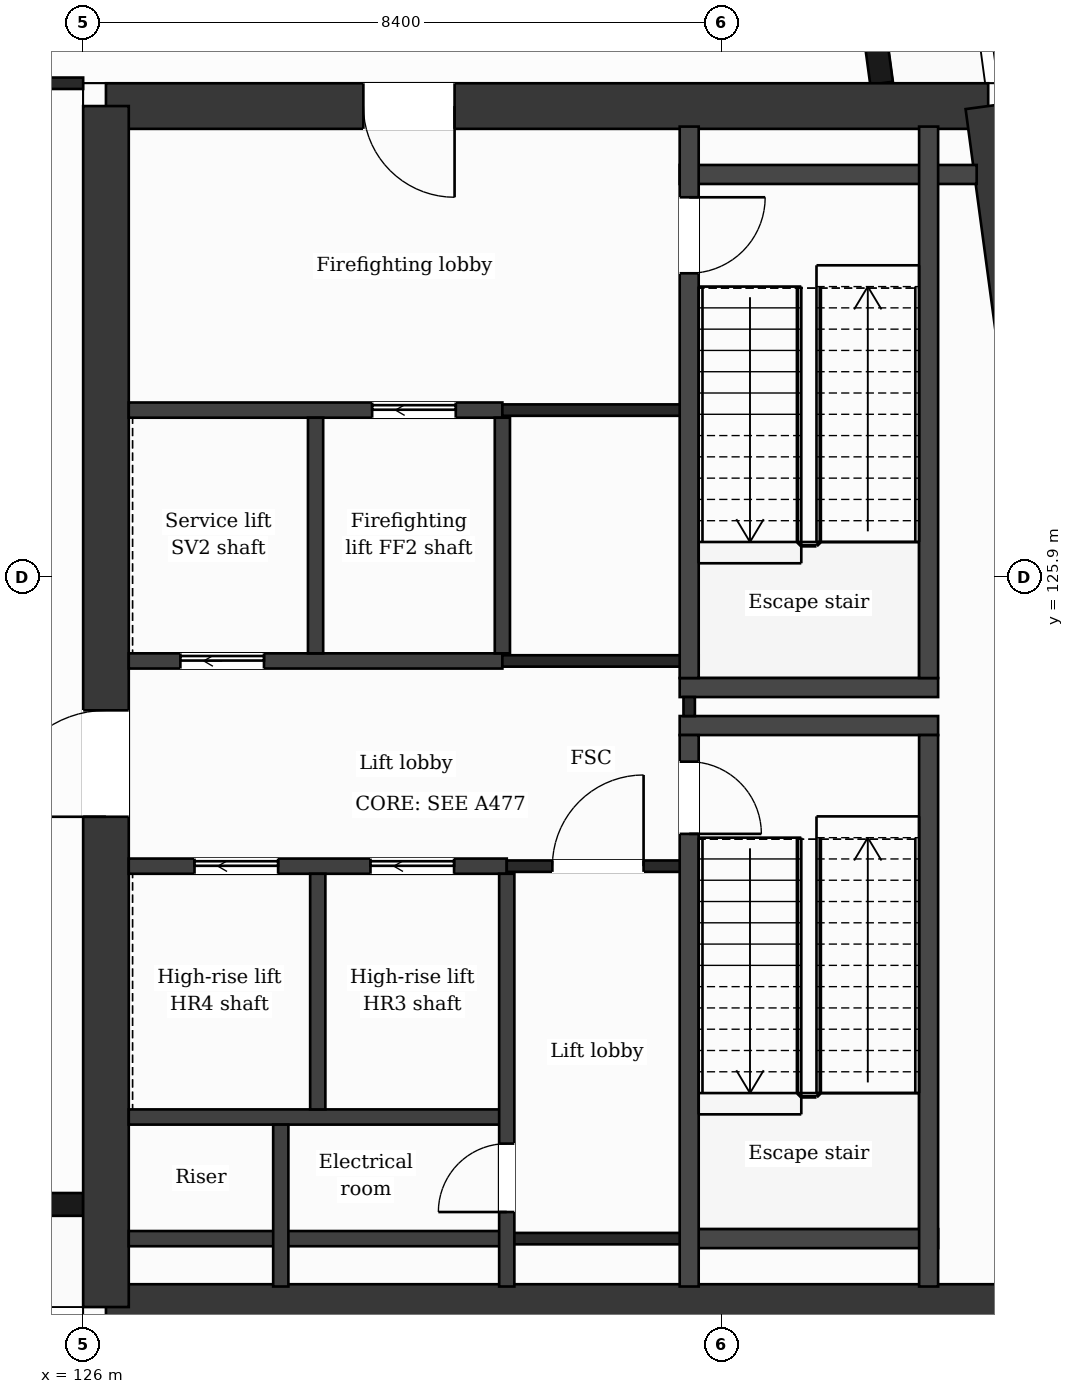
"""IFC4 building model, lengths in metres.
Left out: names, types, materials, properties, quantities, classifications, styles, units other than length and angle.
Written with IfcOpenShell. Run it as: python <this file> out.ifc"""

import sys

from ifc_helpers import new_model, si_unit, direction, frame, frame_2d, origin, place, context, subcontext, project, spatial, rectangle, extrude, element, fill, save


model = new_model("IFC4")
c1 = context("Model", 3, precision=1e-05, world=origin(), true_north=direction((0.0, 1.0)))
c2 = subcontext(c1, "Body", "Model", "MODEL_VIEW")
j1 = project(units=[si_unit("LENGTHUNIT", "METRE"), si_unit("PLANEANGLEUNIT", "RADIAN")], contexts=[c1])
p1 = place(None, origin())
s1 = spatial("IfcSite", under=j1, at=p1, CompositionType="ELEMENT")
p2 = place(p1, origin())
s2 = spatial("IfcBuilding", under=s1, at=p2, CompositionType="ELEMENT")
p3 = place(p2, frame((0.0, 0.0, 315.4)))
s3 = spatial("IfcBuildingStorey", under=s2, at=p3, CompositionType="ELEMENT", Elevation=315.4)
p4 = place(p3, frame((126.3, 132.1, 0.0), z_axis=(0.0, 0.0, 1.0), x_axis=(1.0, 0.0, 0.0)))
e1 = element("IfcWall", 1, at=p4, inside=s3, PredefinedType="SHEAR", context=c2, shape_type="SweptSolid", body=[
    extrude(rectangle(XDim=11.607, YDim=0.6, at=frame_2d((5.803, 0.0))), origin(), (0.0, 0.0, 1.0), 4.5),
])
p5 = place(p4, frame((3.386, 0.0, 0.0)))
e2 = element("IfcOpeningElement", 2, at=p5, cuts=e1, PredefinedType="OPENING", context=c2, shape_type="SweptSolid", body=[
    extrude(rectangle(XDim=1.2, YDim=2.1, at=frame_2d((0.6, 1.05))), frame((0.0, 0.31, 0.0), z_axis=(0.0, -1.0, 0.0), x_axis=(1.0, 0.0, 0.0)), (0.0, 0.0, 1.0), 0.62),
])
p6 = place(p3, frame((137.907, 132.1, 0.0), z_axis=(0.0, 0.0, 1.0), x_axis=(0.13341345841, -0.991060466932, 0.0)))
e3 = element("IfcWall", 3, at=p6, inside=s3, PredefinedType="SHEAR", context=c2, shape_type="SweptSolid", body=[
    extrude(rectangle(XDim=15.943, YDim=0.6, at=frame_2d((7.971, 0.0))), origin(), (0.0, 0.0, 1.0), 4.5),
])
p7 = place(p3, frame((140.034, 116.3, 0.0), z_axis=(0.0, 0.0, 1.0), x_axis=(-1.0, 0.0, 0.0)))
e4 = element("IfcWall", 4, at=p7, inside=s3, PredefinedType="SHEAR", context=c2, shape_type="SweptSolid", body=[
    extrude(rectangle(XDim=13.734, YDim=0.6, at=frame_2d((6.867, 0.0))), origin(), (0.0, 0.0, 1.0), 4.5),
])
p8 = place(p3, frame((126.3, 116.3, 0.0), z_axis=(0.0, 0.0, 1.0), x_axis=(0.0, 1.0, 0.0)))
e5 = element("IfcWall", 5, at=p8, inside=s3, PredefinedType="SHEAR", context=c2, shape_type="SweptSolid", body=[
    extrude(rectangle(XDim=15.8, YDim=0.6, at=frame_2d((7.9, 0.0))), origin(), (0.0, 0.0, 1.0), 4.5),
])
p9 = place(p8, frame((6.45, 0.0, 0.0)))
e6 = element("IfcOpeningElement", 6, at=p9, cuts=e5, PredefinedType="OPENING", context=c2, shape_type="SweptSolid", body=[
    extrude(rectangle(XDim=1.4, YDim=2.1, at=frame_2d((0.7, 1.05))), frame((0.0, 0.31, 0.0), z_axis=(0.0, -1.0, 0.0), x_axis=(1.0, 0.0, 0.0)), (0.0, 0.0, 1.0), 0.62),
])
p10 = place(p3, frame((100.8, 117.65, 0.0), z_axis=(0.0, 0.0, 1.0), x_axis=(1.0, 0.0, 0.0)))
e7 = element("IfcWall", 7, at=p10, inside=s3, PredefinedType="SOLIDWALL", context=c2, shape_type="SweptSolid", body=[
    extrude(rectangle(XDim=25.2, YDim=0.3, at=frame_2d((12.6, 0.0))), origin(), (0.0, 0.0, 1.0), 4.05),
])
p11 = place(p10, frame((1.55, 0.0, 0.9)))
e8 = element("IfcOpeningElement", 8, at=p11, cuts=e7, PredefinedType="OPENING", context=c2, shape_type="SweptSolid", body=[
    extrude(rectangle(XDim=1.2, YDim=2.1, at=frame_2d((0.6, 1.05))), frame((0.0, 0.16, 0.0), z_axis=(0.0, -1.0, 0.0), x_axis=(1.0, 0.0, 0.0)), (0.0, 0.0, 1.0), 0.32),
])
p12 = place(p10, frame((5.7, 0.0, 0.9)))
e9 = element("IfcOpeningElement", 9, at=p12, cuts=e7, PredefinedType="OPENING", context=c2, shape_type="SweptSolid", body=[
    extrude(rectangle(XDim=1.2, YDim=2.1, at=frame_2d((0.6, 1.05))), frame((0.0, 0.16, 0.0), z_axis=(0.0, -1.0, 0.0), x_axis=(1.0, 0.0, 0.0)), (0.0, 0.0, 1.0), 0.32),
])
p13 = place(p10, frame((9.0, 0.0, 0.0)))
e10 = element("IfcOpeningElement", 10, at=p13, cuts=e7, PredefinedType="OPENING", context=c2, shape_type="SweptSolid", body=[
    extrude(rectangle(XDim=1.2, YDim=2.4, at=frame_2d((0.6, 1.2))), frame((0.0, 0.16, 0.0), z_axis=(0.0, -1.0, 0.0), x_axis=(1.0, 0.0, 0.0)), (0.0, 0.0, 1.0), 0.32),
])
p14 = place(p10, frame((10.8, 0.0, 0.9)))
e11 = element("IfcOpeningElement", 11, at=p14, cuts=e7, PredefinedType="OPENING", context=c2, shape_type="SweptSolid", body=[
    extrude(rectangle(XDim=1.2, YDim=2.1, at=frame_2d((0.6, 1.05))), frame((0.0, 0.16, 0.0), z_axis=(0.0, -1.0, 0.0), x_axis=(1.0, 0.0, 0.0)), (0.0, 0.0, 1.0), 0.32),
])
p15 = place(p10, frame((13.5, 0.0, 0.9)))
e12 = element("IfcOpeningElement", 12, at=p15, cuts=e7, PredefinedType="OPENING", context=c2, shape_type="SweptSolid", body=[
    extrude(rectangle(XDim=2.4, YDim=2.1, at=frame_2d((1.2, 1.05))), frame((0.0, 0.16, 0.0), z_axis=(0.0, -1.0, 0.0), x_axis=(1.0, 0.0, 0.0)), (0.0, 0.0, 1.0), 0.32),
])
p16 = place(p10, frame((17.4, 0.0, 0.0)))
e13 = element("IfcOpeningElement", 13, at=p16, cuts=e7, PredefinedType="OPENING", context=c2, shape_type="SweptSolid", body=[
    extrude(rectangle(XDim=1.2, YDim=2.4, at=frame_2d((0.6, 1.2))), frame((0.0, 0.16, 0.0), z_axis=(0.0, -1.0, 0.0), x_axis=(1.0, 0.0, 0.0)), (0.0, 0.0, 1.0), 0.32),
])
p17 = place(p10, frame((19.2, 0.0, 0.9)))
e14 = element("IfcOpeningElement", 14, at=p17, cuts=e7, PredefinedType="OPENING", context=c2, shape_type="SweptSolid", body=[
    extrude(rectangle(XDim=1.2, YDim=2.1, at=frame_2d((0.6, 1.05))), frame((0.0, 0.16, 0.0), z_axis=(0.0, -1.0, 0.0), x_axis=(1.0, 0.0, 0.0)), (0.0, 0.0, 1.0), 0.32),
])
p18 = place(p10, frame((21.85, 0.0, 0.9)))
e15 = element("IfcOpeningElement", 15, at=p18, cuts=e7, PredefinedType="OPENING", context=c2, shape_type="SweptSolid", body=[
    extrude(rectangle(XDim=2.4, YDim=2.1, at=frame_2d((1.2, 1.05))), frame((0.0, 0.16, 0.0), z_axis=(0.0, -1.0, 0.0), x_axis=(1.0, 0.0, 0.0)), (0.0, 0.0, 1.0), 0.32),
])
p19 = place(p3, frame((136.504, 132.4, 0.0), z_axis=(0.0, 0.0, 1.0), x_axis=(-0.133399697462, 0.99106231929, 0.0)))
e16 = element("IfcWall", 16, at=p19, inside=s3, PredefinedType="SOLIDWALL", context=c2, shape_type="SweptSolid", body=[
    extrude(rectangle(XDim=6.74, YDim=0.3, at=frame_2d((3.37, 0.0))), origin(), (0.0, 0.0, 1.0), 4.05),
])
p20 = place(p19, frame((1.115, 0.0, 0.0)))
e17 = element("IfcOpeningElement", 17, at=p20, cuts=e16, PredefinedType="OPENING", context=c2, shape_type="SweptSolid", body=[
    extrude(rectangle(XDim=1.2, YDim=2.4, at=frame_2d((0.6, 1.2))), frame((0.0, 0.16, 0.0), z_axis=(0.0, -1.0, 0.0), x_axis=(1.0, 0.0, 0.0)), (0.0, 0.0, 1.0), 0.32),
])
p21 = place(p19, frame((3.835, 0.0, 0.9)))
e18 = element("IfcOpeningElement", 18, at=p21, cuts=e16, PredefinedType="OPENING", context=c2, shape_type="SweptSolid", body=[
    extrude(rectangle(XDim=2.4, YDim=2.1, at=frame_2d((1.2, 1.05))), frame((0.0, 0.16, 0.0), z_axis=(0.0, -1.0, 0.0), x_axis=(1.0, 0.0, 0.0)), (0.0, 0.0, 1.0), 0.32),
])
p22 = place(p3, frame((126.6, 117.2, 0.0), z_axis=(0.0, 0.0, 1.0), x_axis=(1.0, 0.0, 0.0)))
e19 = element("IfcWall", 19, at=p22, inside=s3, PredefinedType="PARTITIONING", context=c2, shape_type="SweptSolid", body=[
    extrude(rectangle(XDim=4.973, YDim=0.2, at=frame_2d((2.486, 0.0))), origin(), (0.0, 0.0, 1.0), 4.05),
])
p23 = place(p3, frame((131.573, 117.2, 0.0), z_axis=(0.0, 0.0, 1.0), x_axis=(1.0, 0.0, 0.0)))
e20 = element("IfcWall", 20, at=p23, inside=s3, PredefinedType="PARTITIONING", context=c2, shape_type="SweptSolid", body=[
    extrude(rectangle(XDim=2.4, YDim=0.15, at=frame_2d((1.2, 0.0))), origin(), (0.0, 0.0, 1.0), 4.05),
])
p24 = place(p3, frame((133.973, 117.2, 0.0), z_axis=(0.0, 0.0, 1.0), x_axis=(1.0, 0.0, 0.0)))
e21 = element("IfcWall", 21, at=p24, inside=s3, PredefinedType="PARTITIONING", context=c2, shape_type="SweptSolid", body=[
    extrude(rectangle(XDim=3.275, YDim=0.25, at=frame_2d((1.638, 0.0))), origin(), (0.0, 0.0, 1.0), 4.05),
])
p25 = place(p3, frame((126.6, 118.8, 0.0), z_axis=(0.0, 0.0, 1.0), x_axis=(1.0, 0.0, 0.0)))
e22 = element("IfcWall", 22, at=p25, inside=s3, PredefinedType="PARTITIONING", context=c2, shape_type="SweptSolid", body=[
    extrude(rectangle(XDim=4.973, YDim=0.2, at=frame_2d((2.486, 0.0))), origin(), (0.0, 0.0, 1.0), 4.05),
])
p26 = place(p3, frame((126.6, 122.1, 0.0), z_axis=(0.0, 0.0, 1.0), x_axis=(1.0, 0.0, 0.0)))
e23 = element("IfcWall", 23, at=p26, inside=s3, PredefinedType="PARTITIONING", context=c2, shape_type="SweptSolid", body=[
    extrude(rectangle(XDim=4.973, YDim=0.2, at=frame_2d((2.486, 0.0))), origin(), (0.0, 0.0, 1.0), 4.05),
])
p27 = place(p26, frame((3.18, 0.0, 0.0)))
e24 = element("IfcOpeningElement", 24, at=p27, cuts=e23, PredefinedType="OPENING", context=c2, shape_type="SweptSolid", body=[
    extrude(rectangle(XDim=1.1, YDim=2.1, at=frame_2d((0.55, 1.05))), frame((0.0, 0.11, 0.0), z_axis=(0.0, -1.0, 0.0), x_axis=(1.0, 0.0, 0.0)), (0.0, 0.0, 1.0), 0.22),
])
p28 = place(p26, frame((0.865, 0.0, 0.0)))
e25 = element("IfcOpeningElement", 25, at=p28, cuts=e23, PredefinedType="OPENING", context=c2, shape_type="SweptSolid", body=[
    extrude(rectangle(XDim=1.1, YDim=2.1, at=frame_2d((0.55, 1.05))), frame((0.0, 0.11, 0.0), z_axis=(0.0, -1.0, 0.0), x_axis=(1.0, 0.0, 0.0)), (0.0, 0.0, 1.0), 0.22),
])
p29 = place(p3, frame((131.573, 122.1, 0.0), z_axis=(0.0, 0.0, 1.0), x_axis=(1.0, 0.0, 0.0)))
e26 = element("IfcWall", 26, at=p29, inside=s3, PredefinedType="PARTITIONING", context=c2, shape_type="SweptSolid", body=[
    extrude(rectangle(XDim=2.4, YDim=0.15, at=frame_2d((1.2, 0.0))), origin(), (0.0, 0.0, 1.0), 4.05),
])
p30 = place(p29, frame((0.6, 0.0, 0.0)))
e27 = element("IfcOpeningElement", 27, at=p30, cuts=e26, PredefinedType="OPENING", context=c2, shape_type="SweptSolid", body=[
    extrude(rectangle(XDim=1.2, YDim=2.1, at=frame_2d((0.6, 1.05))), frame((0.0, 0.085, 0.0), z_axis=(0.0, -1.0, 0.0), x_axis=(1.0, 0.0, 0.0)), (0.0, 0.0, 1.0), 0.17),
])
for number, where, z_axis, x_axis in (
    (28, (133.848, 123.95, 0.0), (0.0, 0.0, 1.0), (1.0, 0.0, 0.0)),
    (29, (133.848, 124.45, 0.0), (0.0, 0.0, 1.0), (1.0, 0.0, 0.0)),
):
    element("IfcWall", number, at=place(p3, frame(where, z_axis=z_axis, x_axis=x_axis)), inside=s3, PredefinedType="PARTITIONING", context=c2, shape_type="SweptSolid", body=[
        extrude(rectangle(XDim=3.4, YDim=0.25, at=frame_2d((1.7, 0.0))), origin(), (0.0, 0.0, 1.0), 4.05),
    ])
p31 = place(p3, frame((126.6, 124.8, 0.0), z_axis=(0.0, 0.0, 1.0), x_axis=(1.0, 0.0, 0.0)))
e30 = element("IfcWall", 30, at=p31, inside=s3, PredefinedType="PARTITIONING", context=c2, shape_type="SweptSolid", body=[
    extrude(rectangle(XDim=4.915, YDim=0.2, at=frame_2d((2.458, 0.0))), origin(), (0.0, 0.0, 1.0), 4.05),
])
p32 = place(p31, frame((0.679, 0.0, 0.0)))
e31 = element("IfcOpeningElement", 31, at=p32, cuts=e30, PredefinedType="OPENING", context=c2, shape_type="SweptSolid", body=[
    extrude(rectangle(XDim=1.1, YDim=2.1, at=frame_2d((0.55, 1.05))), frame((0.0, 0.11, 0.0), z_axis=(0.0, -1.0, 0.0), x_axis=(1.0, 0.0, 0.0)), (0.0, 0.0, 1.0), 0.22),
])
p33 = place(p3, frame((131.515, 124.8, 0.0), z_axis=(0.0, 0.0, 1.0), x_axis=(1.0, 0.0, 0.0)))
e32 = element("IfcWall", 32, at=p33, inside=s3, PredefinedType="PARTITIONING", context=c2, shape_type="SweptSolid", body=[
    extrude(rectangle(XDim=2.583, YDim=0.15, at=frame_2d((1.291, 0.0))), origin(), (0.0, 0.0, 1.0), 4.05),
])
p34 = place(p3, frame((126.6, 128.1, 0.0), z_axis=(0.0, 0.0, 1.0), x_axis=(1.0, 0.0, 0.0)))
e33 = element("IfcWall", 33, at=p34, inside=s3, PredefinedType="PARTITIONING", context=c2, shape_type="SweptSolid", body=[
    extrude(rectangle(XDim=4.915, YDim=0.2, at=frame_2d((2.458, 0.0))), origin(), (0.0, 0.0, 1.0), 4.05),
])
p35 = place(p34, frame((3.202, 0.0, 0.0)))
e34 = element("IfcOpeningElement", 34, at=p35, cuts=e33, PredefinedType="OPENING", context=c2, shape_type="SweptSolid", body=[
    extrude(rectangle(XDim=1.1, YDim=2.1, at=frame_2d((0.55, 1.05))), frame((0.0, 0.11, 0.0), z_axis=(0.0, -1.0, 0.0), x_axis=(1.0, 0.0, 0.0)), (0.0, 0.0, 1.0), 0.22),
])
p36 = place(p3, frame((131.515, 128.1, 0.0), z_axis=(0.0, 0.0, 1.0), x_axis=(1.0, 0.0, 0.0)))
e35 = element("IfcWall", 35, at=p36, inside=s3, PredefinedType="PARTITIONING", context=c2, shape_type="SweptSolid", body=[
    extrude(rectangle(XDim=2.458, YDim=0.15, at=frame_2d((1.229, 0.0))), origin(), (0.0, 0.0, 1.0), 4.05),
])
p37 = place(p3, frame((133.848, 131.2, 0.0), z_axis=(0.0, 0.0, 1.0), x_axis=(1.0, 0.0, 0.0)))
e36 = element("IfcWall", 36, at=p37, inside=s3, PredefinedType="PARTITIONING", context=c2, shape_type="SweptSolid", body=[
    extrude(rectangle(XDim=3.907, YDim=0.25, at=frame_2d((1.954, 0.0))), origin(), (0.0, 0.0, 1.0), 4.05),
])
p38 = place(p3, frame((121.8, 132.4, 0.0), z_axis=(0.0, 0.0, 1.0), x_axis=(1.0, 0.0, 0.0)))
e37 = element("IfcWall", 37, at=p38, inside=s3, PredefinedType="PARTITIONING", context=c2, shape_type="SweptSolid", body=[
    extrude(rectangle(XDim=4.2, YDim=0.15, at=frame_2d((2.1, 0.0))), origin(), (0.0, 0.0, 1.0), 4.05),
])
p39 = place(p38, frame((0.9, 0.0, 0.0)))
e38 = element("IfcOpeningElement", 38, at=p39, cuts=e37, PredefinedType="OPENING", context=c2, shape_type="SweptSolid", body=[
    extrude(rectangle(XDim=2.4, YDim=2.1, at=frame_2d((1.2, 1.05))), frame((0.0, 0.085, 0.0), z_axis=(0.0, -1.0, 0.0), x_axis=(1.0, 0.0, 0.0)), (0.0, 0.0, 1.0), 0.17),
])
p40 = place(p3, frame((128.6, 116.57, 0.0), z_axis=(0.0, 0.0, 1.0), x_axis=(0.0, 1.0, 0.0)))
e39 = element("IfcWall", 39, at=p40, inside=s3, PredefinedType="PARTITIONING", context=c2, shape_type="SweptSolid", body=[
    extrude(rectangle(XDim=2.13, YDim=0.2, at=frame_2d((1.065, 0.0))), origin(), (0.0, 0.0, 1.0), 4.05),
])
for number, where, z_axis, x_axis in (
    (40, (129.058, 124.9, 0.0), (0.0, 0.0, 1.0), (0.0, 1.0, 0.0)),
    (41, (129.086, 118.9, 0.0), (0.0, 0.0, 1.0), (0.0, 1.0, 0.0)),
    (42, (131.515, 124.9, 0.0), (0.0, 0.0, 1.0), (0.0, 1.0, 0.0)),
):
    element("IfcWall", number, at=place(p3, frame(where, z_axis=z_axis, x_axis=x_axis)), inside=s3, PredefinedType="PARTITIONING", context=c2, shape_type="SweptSolid", body=[
        extrude(rectangle(XDim=3.1, YDim=0.2, at=frame_2d((1.55, 0.0))), origin(), (0.0, 0.0, 1.0), 4.05),
    ])
p41 = place(p3, frame((131.573, 116.57, 0.0), z_axis=(0.0, 0.0, 1.0), x_axis=(0.0, 1.0, 0.0)))
e43 = element("IfcWall", 43, at=p41, inside=s3, PredefinedType="PARTITIONING", context=c2, shape_type="SweptSolid", body=[
    extrude(rectangle(XDim=5.43, YDim=0.2, at=frame_2d((2.715, 0.0))), origin(), (0.0, 0.0, 1.0), 4.05),
])
p42 = place(p41, frame((0.98, 0.0, 0.0)))
e44 = element("IfcOpeningElement", 44, at=p42, cuts=e43, PredefinedType="OPENING", context=c2, shape_type="SweptSolid", body=[
    extrude(rectangle(XDim=0.9, YDim=2.1, at=frame_2d((0.45, 1.05))), frame((0.0, 0.11, 0.0), z_axis=(0.0, -1.0, 0.0), x_axis=(1.0, 0.0, 0.0)), (0.0, 0.0, 1.0), 0.22),
])
p43 = place(p3, frame((133.973, 124.075, 0.0), z_axis=(0.0, 0.0, 1.0), x_axis=(0.0, 1.0, 0.0)))
e45 = element("IfcWall", 45, at=p43, inside=s3, PredefinedType="PARTITIONING", context=c2, shape_type="SweptSolid", body=[
    extrude(rectangle(XDim=0.25, YDim=0.15, at=frame_2d((0.125, 0.0))), origin(), (0.0, 0.0, 1.0), 4.05),
])
p44 = place(p3, frame((133.973, 116.57, 0.0), z_axis=(0.0, 0.0, 1.0), x_axis=(0.0, 1.0, 0.0)))
e46 = element("IfcWall", 46, at=p44, inside=s3, PredefinedType="PARTITIONING", context=c2, shape_type="SweptSolid", body=[
    extrude(rectangle(XDim=7.255, YDim=0.25, at=frame_2d((3.627, 0.0))), origin(), (0.0, 0.0, 1.0), 4.05),
])
p45 = place(p44, frame((5.955, 0.0, 0.0)))
e47 = element("IfcOpeningElement", 47, at=p45, cuts=e46, PredefinedType="OPENING", context=c2, shape_type="SweptSolid", body=[
    extrude(rectangle(XDim=0.95, YDim=2.1, at=frame_2d((0.475, 1.05))), frame((0.0, 0.135, 0.0), z_axis=(0.0, -1.0, 0.0), x_axis=(1.0, 0.0, 0.0)), (0.0, 0.0, 1.0), 0.27),
])
p46 = place(p3, frame((133.973, 124.575, 0.0), z_axis=(0.0, 0.0, 1.0), x_axis=(0.0, 1.0, 0.0)))
e48 = element("IfcWall", 48, at=p46, inside=s3, PredefinedType="PARTITIONING", context=c2, shape_type="SweptSolid", body=[
    extrude(rectangle(XDim=7.255, YDim=0.25, at=frame_2d((3.627, 0.0))), origin(), (0.0, 0.0, 1.0), 4.05),
])
p47 = place(p46, frame((5.325, 0.0, 0.0)))
e49 = element("IfcOpeningElement", 49, at=p47, cuts=e48, PredefinedType="OPENING", context=c2, shape_type="SweptSolid", body=[
    extrude(rectangle(XDim=1.0, YDim=2.1, at=frame_2d((0.5, 1.05))), frame((0.0, 0.135, 0.0), z_axis=(0.0, -1.0, 0.0), x_axis=(1.0, 0.0, 0.0)), (0.0, 0.0, 1.0), 0.27),
])
p48 = place(p3, frame((137.123, 116.57, 0.0), z_axis=(0.0, 0.0, 1.0), x_axis=(0.0, 1.0, 0.0)))
e50 = element("IfcWall", 50, at=p48, inside=s3, PredefinedType="PARTITIONING", context=c2, shape_type="SweptSolid", body=[
    extrude(rectangle(XDim=7.255, YDim=0.25, at=frame_2d((3.627, 0.0))), origin(), (0.0, 0.0, 1.0), 4.05),
])
p49 = place(p3, frame((137.123, 124.575, 0.0), z_axis=(0.0, 0.0, 1.0), x_axis=(0.0, 1.0, 0.0)))
e51 = element("IfcWall", 51, at=p49, inside=s3, PredefinedType="PARTITIONING", context=c2, shape_type="SweptSolid", body=[
    extrude(rectangle(XDim=7.255, YDim=0.25, at=frame_2d((3.627, 0.0))), origin(), (0.0, 0.0, 1.0), 4.05),
])
p50 = place(p30, origin())
e52 = element("IfcDoor", 52, at=p50, inside=s3, OperationType="SINGLE_SWING_RIGHT", PredefinedType="DOOR", context=c2, shape_type="SweptSolid", body=[
    extrude(rectangle(XDim=1.2, YDim=2.1, at=frame_2d((0.6, 1.05))), frame((0.0, 0.025, 0.0), z_axis=(0.0, -1.0, 0.0), x_axis=(1.0, 0.0, 0.0)), (0.0, 0.0, 1.0), 0.05),
])
fill(e27, e52)
p51 = place(p27, origin())
e53 = element("IfcDoor", 53, at=p51, inside=s3, OperationType="SLIDING_TO_LEFT", PredefinedType="DOOR", context=c2, shape_type="SweptSolid", body=[
    extrude(rectangle(XDim=1.1, YDim=2.1, at=frame_2d((0.55, 1.05))), frame((0.0, 0.025, 0.0), z_axis=(0.0, -1.0, 0.0), x_axis=(1.0, 0.0, 0.0)), (0.0, 0.0, 1.0), 0.05),
])
fill(e24, e53)
p52 = place(p28, origin())
e54 = element("IfcDoor", 54, at=p52, inside=s3, OperationType="SLIDING_TO_LEFT", PredefinedType="DOOR", context=c2, shape_type="SweptSolid", body=[
    extrude(rectangle(XDim=1.1, YDim=2.1, at=frame_2d((0.55, 1.05))), frame((0.0, 0.025, 0.0), z_axis=(0.0, -1.0, 0.0), x_axis=(1.0, 0.0, 0.0)), (0.0, 0.0, 1.0), 0.05),
])
fill(e25, e54)
p53 = place(p35, origin())
e55 = element("IfcDoor", 55, at=p53, inside=s3, OperationType="SLIDING_TO_LEFT", PredefinedType="DOOR", context=c2, shape_type="SweptSolid", body=[
    extrude(rectangle(XDim=1.1, YDim=2.1, at=frame_2d((0.55, 1.05))), frame((0.0, 0.025, 0.0), z_axis=(0.0, -1.0, 0.0), x_axis=(1.0, 0.0, 0.0)), (0.0, 0.0, 1.0), 0.05),
])
fill(e34, e55)
p54 = place(p32, origin())
e56 = element("IfcDoor", 56, at=p54, inside=s3, OperationType="SLIDING_TO_LEFT", PredefinedType="DOOR", context=c2, shape_type="SweptSolid", body=[
    extrude(rectangle(XDim=1.1, YDim=2.1, at=frame_2d((0.55, 1.05))), frame((0.0, 0.025, 0.0), z_axis=(0.0, -1.0, 0.0), x_axis=(1.0, 0.0, 0.0)), (0.0, 0.0, 1.0), 0.05),
])
fill(e31, e56)
p55 = place(p45, origin())
e57 = element("IfcDoor", 57, at=p55, inside=s3, OperationType="SINGLE_SWING_LEFT", PredefinedType="DOOR", context=c2, shape_type="SweptSolid", body=[
    extrude(rectangle(XDim=0.95, YDim=2.1, at=frame_2d((0.475, 1.05))), frame((0.0, 0.025, 0.0), z_axis=(0.0, -1.0, 0.0), x_axis=(1.0, 0.0, 0.0)), (0.0, 0.0, 1.0), 0.05),
])
fill(e47, e57)
p56 = place(p47, origin())
e58 = element("IfcDoor", 58, at=p56, inside=s3, OperationType="SINGLE_SWING_RIGHT", PredefinedType="DOOR", context=c2, shape_type="SweptSolid", body=[
    extrude(rectangle(XDim=1.0, YDim=2.1, at=frame_2d((0.5, 1.05))), frame((0.0, 0.025, 0.0), z_axis=(0.0, -1.0, 0.0), x_axis=(1.0, 0.0, 0.0)), (0.0, 0.0, 1.0), 0.05),
])
fill(e49, e58)
p57 = place(p42, origin())
e59 = element("IfcDoor", 59, at=p57, inside=s3, OperationType="SINGLE_SWING_LEFT", PredefinedType="DOOR", context=c2, shape_type="SweptSolid", body=[
    extrude(rectangle(XDim=0.9, YDim=2.1, at=frame_2d((0.45, 1.05))), frame((0.0, 0.025, 0.0), z_axis=(0.0, -1.0, 0.0), x_axis=(1.0, 0.0, 0.0)), (0.0, 0.0, 1.0), 0.05),
])
fill(e44, e59)
p58 = place(p5, origin())
e60 = element("IfcDoor", 60, at=p58, inside=s3, OperationType="SINGLE_SWING_RIGHT", PredefinedType="DOOR", context=c2, shape_type="SweptSolid", body=[
    extrude(rectangle(XDim=1.2, YDim=2.1, at=frame_2d((0.6, 1.05))), frame((0.0, 0.025, 0.0), z_axis=(0.0, -1.0, 0.0), x_axis=(1.0, 0.0, 0.0)), (0.0, 0.0, 1.0), 0.05),
])
fill(e2, e60)
p59 = place(p9, origin())
e61 = element("IfcDoor", 61, at=p59, inside=s3, OperationType="SINGLE_SWING_LEFT", PredefinedType="DOOR", context=c2, shape_type="SweptSolid", body=[
    extrude(rectangle(XDim=1.4, YDim=2.1, at=frame_2d((0.7, 1.05))), frame((0.0, 0.025, 0.0), z_axis=(0.0, -1.0, 0.0), x_axis=(1.0, 0.0, 0.0)), (0.0, 0.0, 1.0), 0.05),
])
fill(e6, e61)
save(model, sys.argv[1])
